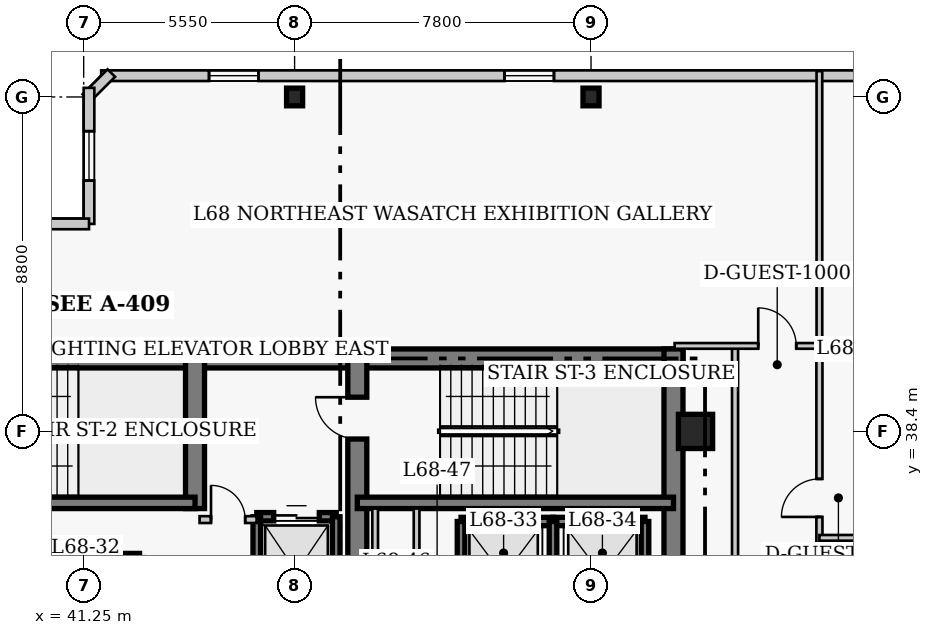
"""IFC4 building model, lengths in metres.
Left out: names, types, materials, properties, quantities, classifications, styles, units other than length and angle.
Written with IfcOpenShell. Run it as: python <this file> out.ifc"""

import sys

from ifc_helpers import new_model, si_unit, direction, frame, frame_2d, origin, origin_2d, place, context, subcontext, project, spatial, rectangle, i_section, extrude, element, fill, save


model = new_model("IFC4")
c1 = context("Model", 3, precision=1e-05, world=origin(), true_north=direction((0.0, 1.0)))
c2 = subcontext(c1, "Body", "Model", "MODEL_VIEW")
j1 = project(units=[si_unit("LENGTHUNIT", "METRE"), si_unit("PLANEANGLEUNIT", "RADIAN")], contexts=[c1])
p1 = place(None, origin())
s1 = spatial("IfcSite", under=j1, at=p1, CompositionType="ELEMENT")
p2 = place(p1, origin())
s2 = spatial("IfcBuilding", under=s1, at=p2, CompositionType="ELEMENT")
p3 = place(p2, frame((0.0, 0.0, 273.4)))
s3 = spatial("IfcBuildingStorey", under=s2, at=p3, CompositionType="ELEMENT", Elevation=273.4)
p4 = place(p3, frame((35.85, 40.32, 0.0), z_axis=(0.0, 0.0, 1.0), x_axis=(1.0, 0.0, 0.0)))
e1 = element("IfcWall", 1, at=p4, inside=s3, PredefinedType="SHEAR", context=c2, shape_type="SweptSolid", body=[
    extrude(rectangle(XDim=12.6, YDim=0.5, at=frame_2d((6.3, 0.0))), origin(), (0.0, 0.0, 1.0), 4.0),
])
p5 = place(p3, frame((48.45, 40.32, 0.0), z_axis=(0.0, 0.0, 1.0), x_axis=(1.0, 0.0, 0.0)))
e2 = element("IfcWall", 2, at=p5, inside=s3, PredefinedType="SHEAR", context=c2, shape_type="SweptSolid", body=[
    extrude(rectangle(XDim=8.57, YDim=0.5, at=frame_2d((4.285, 0.0))), origin(), (0.0, 0.0, 1.0), 4.0),
])
p6 = place(p3, frame((56.77, 27.05, 0.0), z_axis=(0.0, 0.0, 1.0), x_axis=(0.0, 1.0, 0.0)))
e3 = element("IfcWall", 3, at=p6, inside=s3, PredefinedType="SHEAR", context=c2, shape_type="SweptSolid", body=[
    extrude(rectangle(XDim=13.52, YDim=0.5, at=frame_2d((6.76, 0.0))), origin(), (0.0, 0.0, 1.0), 4.0),
])
p7 = place(p3, frame((44.18, 36.37, 0.0), z_axis=(0.0, 0.0, 1.0), x_axis=(0.0, 1.0, 0.0)))
e4 = element("IfcWall", 4, at=p7, inside=s3, PredefinedType="SHEAR", context=c2, shape_type="SweptSolid", body=[
    extrude(rectangle(XDim=3.95, YDim=0.5, at=frame_2d((1.975, 0.0))), origin(), (0.0, 0.0, 1.0), 4.0),
])
p8 = place(p3, frame((48.45, 32.5, 0.0), z_axis=(0.0, 0.0, 1.0), x_axis=(0.0, 1.0, 0.0)))
e5 = element("IfcWall", 5, at=p8, inside=s3, PredefinedType="SHEAR", context=c2, shape_type="SweptSolid", body=[
    extrude(rectangle(XDim=7.82, YDim=0.5, at=frame_2d((3.91, 0.0))), origin(), (0.0, 0.0, 1.0), 4.0),
])
p9 = place(p8, frame((5.7, 0.0, 0.0)))
e6 = element("IfcOpeningElement", 6, at=p9, cuts=e5, PredefinedType="OPENING", context=c2, shape_type="SweptSolid", body=[
    extrude(rectangle(XDim=1.1, YDim=2.15, at=frame_2d((0.55, 1.075))), frame((0.0, 0.26, 0.0), z_axis=(0.0, -1.0, 0.0), x_axis=(1.0, 0.0, 0.0)), (0.0, 0.0, 1.0), 0.52),
])
p10 = place(p3, frame((35.85, 36.52, 0.0), z_axis=(0.0, 0.0, 1.0), x_axis=(1.0, 0.0, 0.0)))
e7 = element("IfcWall", 7, at=p10, inside=s3, PredefinedType="SHEAR", context=c2, shape_type="SweptSolid", body=[
    extrude(rectangle(XDim=8.33, YDim=0.3, at=frame_2d((4.165, 0.0))), origin(), (0.0, 0.0, 1.0), 4.0),
])
p11 = place(p3, frame((48.45, 36.52, 0.0), z_axis=(0.0, 0.0, 1.0), x_axis=(1.0, 0.0, 0.0)))
e8 = element("IfcWall", 8, at=p11, inside=s3, PredefinedType="SHEAR", context=c2, shape_type="SweptSolid", body=[
    extrude(rectangle(XDim=8.32, YDim=0.3, at=frame_2d((4.16, 0.0))), origin(), (0.0, 0.0, 1.0), 4.0),
])
for number, where, z_axis, x_axis in (
    (9, (46.8, 47.2, 0.0), (0.0, 0.0, 1.0), (1.0, 0.0, 0.0)),
    (10, (54.6, 47.2, 0.0), (0.0, 0.0, 1.0), (1.0, 0.0, 0.0)),
):
    element("IfcColumn", number, at=place(p3, frame(where, z_axis=z_axis, x_axis=x_axis)), inside=s3, PredefinedType="COLUMN", context=c2, shape_type="SweptSolid", body=[
        extrude(i_section(OverallWidth=0.422, OverallDepth=0.465, WebThickness=0.045, FlangeThickness=0.073, FilletRadius=0.017, at=origin_2d()), origin(), (0.0, 0.0, 1.0), 4.0),
    ])
p12 = place(p3, frame((57.35, 38.4, 0.0), z_axis=(0.0, 0.0, 1.0), x_axis=(1.0, 0.0, 0.0)))
e11 = element("IfcColumn", 11, at=p12, inside=s3, PredefinedType="COLUMN", context=c2, shape_type="SweptSolid", body=[
    extrude(rectangle(XDim=0.9, YDim=0.9, at=origin_2d()), origin(), (0.0, 0.0, 1.0), 4.0),
])
p13 = place(p3, frame((66.54, 47.76, 0.0), z_axis=(0.0, 0.0, 1.0), x_axis=(-1.0, 0.0, 0.0)))
e12 = element("IfcWall", 12, at=p13, inside=s3, PredefinedType="SOLIDWALL", context=c2, shape_type="SweptSolid", body=[
    extrude(rectangle(XDim=24.83, YDim=0.28, at=frame_2d((12.415, 0.0))), origin(), (0.0, 0.0, 1.0), 3.76),
])
p14 = place(p13, frame((3.488, 0.0, 0.85)))
e13 = element("IfcOpeningElement", 13, at=p14, cuts=e12, PredefinedType="OPENING", context=c2, shape_type="SweptSolid", body=[
    extrude(rectangle(XDim=1.3, YDim=1.7, at=frame_2d((0.65, 0.85))), frame((0.0, 0.15, 0.0), z_axis=(0.0, -1.0, 0.0), x_axis=(1.0, 0.0, 0.0)), (0.0, 0.0, 1.0), 0.3),
])
p15 = place(p13, frame((12.915, 0.0, 0.85)))
e14 = element("IfcOpeningElement", 14, at=p15, cuts=e12, PredefinedType="OPENING", context=c2, shape_type="SweptSolid", body=[
    extrude(rectangle(XDim=1.3, YDim=1.7, at=frame_2d((0.65, 0.85))), frame((0.0, 0.15, 0.0), z_axis=(0.0, -1.0, 0.0), x_axis=(1.0, 0.0, 0.0)), (0.0, 0.0, 1.0), 0.3),
])
p16 = place(p13, frame((20.692, 0.0, 0.85)))
e15 = element("IfcOpeningElement", 15, at=p16, cuts=e12, PredefinedType="OPENING", context=c2, shape_type="SweptSolid", body=[
    extrude(rectangle(XDim=1.3, YDim=1.7, at=frame_2d((0.65, 0.85))), frame((0.0, 0.15, 0.0), z_axis=(0.0, -1.0, 0.0), x_axis=(1.0, 0.0, 0.0)), (0.0, 0.0, 1.0), 0.3),
])
p17 = place(p3, frame((41.977, 47.829, 0.0), z_axis=(0.0, 0.0, 1.0), x_axis=(-0.706975312048, -0.707238225886, 0.0)))
e16 = element("IfcWall", 16, at=p17, inside=s3, PredefinedType="SOLIDWALL", context=c2, shape_type="SweptSolid", body=[
    extrude(rectangle(XDim=0.929, YDim=0.28, at=frame_2d((0.464, 0.0))), origin(), (0.0, 0.0, 1.0), 3.76),
])
p18 = place(p3, frame((41.39, 47.44, 0.0), z_axis=(0.0, 0.0, 1.0), x_axis=(0.0, -1.0, 0.0)))
e17 = element("IfcWall", 17, at=p18, inside=s3, PredefinedType="SOLIDWALL", context=c2, shape_type="SweptSolid", body=[
    extrude(rectangle(XDim=3.58, YDim=0.28, at=frame_2d((1.79, 0.0))), origin(), (0.0, 0.0, 1.0), 3.76),
])
p19 = place(p18, frame((1.14, 0.0, 0.85)))
e18 = element("IfcOpeningElement", 18, at=p19, cuts=e17, PredefinedType="OPENING", context=c2, shape_type="SweptSolid", body=[
    extrude(rectangle(XDim=1.3, YDim=1.7, at=frame_2d((0.65, 0.85))), frame((0.0, 0.15, 0.0), z_axis=(0.0, -1.0, 0.0), x_axis=(1.0, 0.0, 0.0)), (0.0, 0.0, 1.0), 0.3),
])
p20 = place(p3, frame((41.39, 43.86, 0.0), z_axis=(0.0, 0.0, 1.0), x_axis=(-1.0, 0.0, 0.0)))
e19 = element("IfcWall", 19, at=p20, inside=s3, PredefinedType="SOLIDWALL", context=c2, shape_type="SweptSolid", body=[
    extrude(rectangle(XDim=4.78, YDim=0.28, at=frame_2d((2.39, 0.0))), origin(), (0.0, 0.0, 1.0), 3.76),
])
p21 = place(p20, frame((1.74, 0.0, 0.85)))
e20 = element("IfcOpeningElement", 20, at=p21, cuts=e19, PredefinedType="OPENING", context=c2, shape_type="SweptSolid", body=[
    extrude(rectangle(XDim=1.3, YDim=1.7, at=frame_2d((0.65, 0.85))), frame((0.0, 0.15, 0.0), z_axis=(0.0, -1.0, 0.0), x_axis=(1.0, 0.0, 0.0)), (0.0, 0.0, 1.0), 0.3),
])
p22 = place(p3, frame((40.4, 35.08, 0.0), z_axis=(0.0, 0.0, 1.0), x_axis=(1.0, 0.0, 0.0)))
e21 = element("IfcWall", 21, at=p22, inside=s3, PredefinedType="SHEAR", context=c2, shape_type="SweptSolid", body=[
    extrude(rectangle(XDim=2.32, YDim=0.22, at=frame_2d((1.16, 0.0))), origin(), (0.0, 0.0, 1.0), 4.0),
])
p23 = place(p3, frame((51.18, 36.03, 0.0), z_axis=(0.0, 0.0, 1.0), x_axis=(1.0, 0.0, 0.0)))
e22 = element("IfcWall", 22, at=p23, inside=s3, PredefinedType="SHEAR", context=c2, shape_type="SweptSolid", body=[
    extrude(rectangle(XDim=2.42, YDim=0.22, at=frame_2d((1.21, 0.0))), origin(), (0.0, 0.0, 1.0), 4.0),
])
p24 = place(p3, frame((51.18, 33.17, 0.0), z_axis=(0.0, 0.0, 1.0), x_axis=(0.0, 1.0, 0.0)))
e23 = element("IfcWall", 23, at=p24, inside=s3, PredefinedType="SHEAR", context=c2, shape_type="SweptSolid", body=[
    extrude(rectangle(XDim=2.86, YDim=0.2, at=frame_2d((1.43, 0.0))), origin(), (0.0, 0.0, 1.0), 4.0),
])
p25 = place(p3, frame((53.6, 36.03, 0.0), z_axis=(0.0, 0.0, 1.0), x_axis=(1.0, 0.0, 0.0)))
e24 = element("IfcWall", 24, at=p25, inside=s3, PredefinedType="SHEAR", context=c2, shape_type="SweptSolid", body=[
    extrude(rectangle(XDim=2.42, YDim=0.22, at=frame_2d((1.21, 0.0))), origin(), (0.0, 0.0, 1.0), 4.0),
])
for number, where, z_axis, x_axis in (
    (25, (53.6, 33.17, 0.0), (0.0, 0.0, 1.0), (0.0, 1.0, 0.0)),
    (26, (56.02, 33.17, 0.0), (0.0, 0.0, 1.0), (0.0, 1.0, 0.0)),
):
    element("IfcWall", number, at=place(p3, frame(where, z_axis=z_axis, x_axis=x_axis)), inside=s3, PredefinedType="SHEAR", context=c2, shape_type="SweptSolid", body=[
        extrude(rectangle(XDim=2.86, YDim=0.2, at=frame_2d((1.43, 0.0))), origin(), (0.0, 0.0, 1.0), 4.0),
    ])
p26 = place(p3, frame((45.805, 36.155, 0.0), z_axis=(0.0, 0.0, 1.0), x_axis=(1.0, 0.0, 0.0)))
e27 = element("IfcWall", 27, at=p26, inside=s3, PredefinedType="SHEAR", context=c2, shape_type="SweptSolid", body=[
    extrude(rectangle(XDim=2.09, YDim=0.22, at=frame_2d((1.045, 0.0))), origin(), (0.0, 0.0, 1.0), 4.0),
])
p27 = place(p26, frame((0.445, 0.0, 0.0)))
e28 = element("IfcOpeningElement", 28, at=p27, cuts=e27, PredefinedType="OPENING", context=c2, shape_type="SweptSolid", body=[
    extrude(rectangle(XDim=1.2, YDim=2.15, at=frame_2d((0.6, 1.075))), frame((0.0, 0.12, 0.0), z_axis=(0.0, -1.0, 0.0), x_axis=(1.0, 0.0, 0.0)), (0.0, 0.0, 1.0), 0.24),
])
p28 = place(p3, frame((45.805, 32.65, 0.0), z_axis=(0.0, 0.0, 1.0), x_axis=(0.0, 1.0, 0.0)))
e29 = element("IfcWall", 29, at=p28, inside=s3, PredefinedType="SHEAR", context=c2, shape_type="SweptSolid", body=[
    extrude(rectangle(XDim=3.505, YDim=0.2, at=frame_2d((1.752, 0.0))), origin(), (0.0, 0.0, 1.0), 4.0),
])
p29 = place(p3, frame((47.895, 33.245, 0.0), z_axis=(0.0, 0.0, 1.0), x_axis=(0.0, 1.0, 0.0)))
e30 = element("IfcWall", 30, at=p29, inside=s3, PredefinedType="SHEAR", context=c2, shape_type="SweptSolid", body=[
    extrude(rectangle(XDim=2.91, YDim=0.2, at=frame_2d((1.455, 0.0))), origin(), (0.0, 0.0, 1.0), 4.0),
])
p30 = place(p3, frame((44.3, 36.08, 0.0), z_axis=(0.0, 0.0, 1.0), x_axis=(1.0, 0.0, 0.0)))
e31 = element("IfcWall", 31, at=p30, inside=s3, PredefinedType="PARTITIONING", context=c2, shape_type="SweptSolid", body=[
    extrude(rectangle(XDim=1.5, YDim=0.18, at=frame_2d((0.75, 0.0))), origin(), (0.0, 0.0, 1.0), 3.76),
])
p31 = place(p30, frame((0.3, 0.0, 0.0)))
e32 = element("IfcOpeningElement", 32, at=p31, cuts=e31, PredefinedType="OPENING", context=c2, shape_type="SweptSolid", body=[
    extrude(rectangle(XDim=0.9, YDim=2.15, at=frame_2d((0.45, 1.075))), frame((0.0, 0.1, 0.0), z_axis=(0.0, -1.0, 0.0), x_axis=(1.0, 0.0, 0.0)), (0.0, 0.0, 1.0), 0.2),
])
for number, where, z_axis, x_axis in (
    (33, (48.92, 32.75, 0.0), (0.0, 0.0, 1.0), (0.0, 1.0, 0.0)),
    (34, (50.01, 32.75, 0.0), (0.0, 0.0, 1.0), (0.0, 1.0, 0.0)),
):
    element("IfcWall", number, at=place(p3, frame(where, z_axis=z_axis, x_axis=x_axis)), inside=s3, PredefinedType="PARTITIONING", context=c2, shape_type="SweptSolid", body=[
        extrude(rectangle(XDim=3.62, YDim=0.15, at=frame_2d((1.81, 0.0))), origin(), (0.0, 0.0, 1.0), 3.76),
    ])
p32 = place(p3, frame((60.61, 24.25, 0.0), z_axis=(0.0, 0.0, 1.0), x_axis=(0.0, 1.0, 0.0)))
e35 = element("IfcWall", 35, at=p32, inside=s3, PredefinedType="PARTITIONING", context=c2, shape_type="SweptSolid", body=[
    extrude(rectangle(XDim=16.4, YDim=0.16, at=frame_2d((8.2, 0.0))), origin(), (0.0, 0.0, 1.0), 3.76),
])
p33 = place(p32, frame((0.46, 0.0, 0.0)))
e36 = element("IfcOpeningElement", 36, at=p33, cuts=e35, PredefinedType="OPENING", context=c2, shape_type="SweptSolid", body=[
    extrude(rectangle(XDim=0.95, YDim=2.1, at=frame_2d((0.475, 1.05))), frame((0.0, 0.09, 0.0), z_axis=(0.0, -1.0, 0.0), x_axis=(1.0, 0.0, 0.0)), (0.0, 0.0, 1.0), 0.18),
])
p34 = place(p32, frame((11.9, 0.0, 0.0)))
e37 = element("IfcOpeningElement", 37, at=p34, cuts=e35, PredefinedType="OPENING", context=c2, shape_type="SweptSolid", body=[
    extrude(rectangle(XDim=1.0, YDim=2.15, at=frame_2d((0.5, 1.075))), frame((0.0, 0.09, 0.0), z_axis=(0.0, -1.0, 0.0), x_axis=(1.0, 0.0, 0.0)), (0.0, 0.0, 1.0), 0.18),
])
p35 = place(p3, frame((58.39, 26.41, 0.0), z_axis=(0.0, 0.0, 1.0), x_axis=(0.0, 1.0, 0.0)))
e38 = element("IfcWall", 38, at=p35, inside=s3, PredefinedType="PARTITIONING", context=c2, shape_type="SweptSolid", body=[
    extrude(rectangle(XDim=14.24, YDim=0.16, at=frame_2d((7.12, 0.0))), origin(), (0.0, 0.0, 1.0), 3.76),
])
p36 = place(p3, frame((56.8, 40.65, 0.0), z_axis=(0.0, 0.0, 1.0), x_axis=(1.0, 0.0, 0.0)))
e39 = element("IfcWall", 39, at=p36, inside=s3, PredefinedType="PARTITIONING", context=c2, shape_type="SweptSolid", body=[
    extrude(rectangle(XDim=3.81, YDim=0.15, at=frame_2d((1.905, 0.0))), origin(), (0.0, 0.0, 1.0), 3.76),
])
p37 = place(p36, frame((2.2, 0.0, 0.0)))
e40 = element("IfcOpeningElement", 40, at=p37, cuts=e39, PredefinedType="OPENING", context=c2, shape_type="SweptSolid", body=[
    extrude(rectangle(XDim=1.0, YDim=2.15, at=frame_2d((0.5, 1.075))), frame((0.0, 0.085, 0.0), z_axis=(0.0, -1.0, 0.0), x_axis=(1.0, 0.0, 0.0)), (0.0, 0.0, 1.0), 0.17),
])
p38 = place(p3, frame((60.61, 40.65, 0.0), z_axis=(0.0, 0.0, 1.0), x_axis=(0.0, 1.0, 0.0)))
e41 = element("IfcWall", 41, at=p38, inside=s3, PredefinedType="PARTITIONING", context=c2, shape_type="SweptSolid", body=[
    extrude(rectangle(XDim=7.23, YDim=0.15, at=frame_2d((3.615, 0.0))), origin(), (0.0, 0.0, 1.0), 3.76),
])
p39 = place(p3, frame((60.61, 35.6, 0.0), z_axis=(0.0, 0.0, 1.0), x_axis=(1.0, 0.0, 0.0)))
e42 = element("IfcWall", 42, at=p39, inside=s3, PredefinedType="PARTITIONING", context=c2, shape_type="SweptSolid", body=[
    extrude(rectangle(XDim=4.49, YDim=0.15, at=frame_2d((2.245, 0.0))), origin(), (0.0, 0.0, 1.0), 3.76),
])
p40 = place(p15, origin())
e43 = element("IfcWindow", 43, at=p40, inside=s3, PartitioningType="SINGLE_PANEL", PredefinedType="WINDOW", context=c2, shape_type="SweptSolid", body=[
    extrude(rectangle(XDim=1.3, YDim=1.7, at=frame_2d((0.65, 0.85))), frame((0.0, 0.03, 0.0), z_axis=(0.0, -1.0, 0.0), x_axis=(1.0, 0.0, 0.0)), (0.0, 0.0, 1.0), 0.06),
])
fill(e14, e43)
p41 = place(p16, origin())
e44 = element("IfcWindow", 44, at=p41, inside=s3, PartitioningType="SINGLE_PANEL", PredefinedType="WINDOW", context=c2, shape_type="SweptSolid", body=[
    extrude(rectangle(XDim=1.3, YDim=1.7, at=frame_2d((0.65, 0.85))), frame((0.0, 0.03, 0.0), z_axis=(0.0, -1.0, 0.0), x_axis=(1.0, 0.0, 0.0)), (0.0, 0.0, 1.0), 0.06),
])
fill(e15, e44)
p42 = place(p19, origin())
e45 = element("IfcWindow", 45, at=p42, inside=s3, PartitioningType="SINGLE_PANEL", PredefinedType="WINDOW", context=c2, shape_type="SweptSolid", body=[
    extrude(rectangle(XDim=1.3, YDim=1.7, at=frame_2d((0.65, 0.85))), frame((0.0, 0.03, 0.0), z_axis=(0.0, -1.0, 0.0), x_axis=(1.0, 0.0, 0.0)), (0.0, 0.0, 1.0), 0.06),
])
fill(e18, e45)
p43 = place(p27, origin())
e46 = element("IfcDoor", 46, at=p43, inside=s3, OperationType="DOUBLE_DOOR_SLIDING", PredefinedType="DOOR", context=c2, shape_type="SweptSolid", body=[
    extrude(rectangle(XDim=1.2, YDim=2.15, at=frame_2d((0.6, 1.075))), frame((0.0, 0.025, 0.0), z_axis=(0.0, -1.0, 0.0), x_axis=(1.0, 0.0, 0.0)), (0.0, 0.0, 1.0), 0.05),
])
fill(e28, e46)
p44 = place(p31, origin())
e47 = element("IfcDoor", 47, at=p44, inside=s3, OperationType="SINGLE_SWING_LEFT", PredefinedType="DOOR", context=c2, shape_type="SweptSolid", body=[
    extrude(rectangle(XDim=0.9, YDim=2.15, at=frame_2d((0.45, 1.075))), frame((0.0, 0.025, 0.0), z_axis=(0.0, -1.0, 0.0), x_axis=(1.0, 0.0, 0.0)), (0.0, 0.0, 1.0), 0.05),
])
fill(e32, e47)
p45 = place(p37, origin())
e48 = element("IfcDoor", 48, at=p45, inside=s3, OperationType="SINGLE_SWING_LEFT", PredefinedType="DOOR", context=c2, shape_type="SweptSolid", body=[
    extrude(rectangle(XDim=1.0, YDim=2.15, at=frame_2d((0.5, 1.075))), frame((0.0, 0.025, 0.0), z_axis=(0.0, -1.0, 0.0), x_axis=(1.0, 0.0, 0.0)), (0.0, 0.0, 1.0), 0.05),
])
fill(e40, e48)
p46 = place(p34, origin())
e49 = element("IfcDoor", 49, at=p46, inside=s3, OperationType="SINGLE_SWING_LEFT", PredefinedType="DOOR", context=c2, shape_type="SweptSolid", body=[
    extrude(rectangle(XDim=1.0, YDim=2.15, at=frame_2d((0.5, 1.075))), frame((0.0, 0.025, 0.0), z_axis=(0.0, -1.0, 0.0), x_axis=(1.0, 0.0, 0.0)), (0.0, 0.0, 1.0), 0.05),
])
fill(e37, e49)
p47 = place(p9, origin())
e50 = element("IfcDoor", 50, at=p47, inside=s3, OperationType="SINGLE_SWING_RIGHT", PredefinedType="DOOR", context=c2, shape_type="SweptSolid", body=[
    extrude(rectangle(XDim=1.1, YDim=2.15, at=frame_2d((0.55, 1.075))), frame((0.0, 0.025, 0.0), z_axis=(0.0, -1.0, 0.0), x_axis=(1.0, 0.0, 0.0)), (0.0, 0.0, 1.0), 0.05),
])
fill(e6, e50)
save(model, sys.argv[1])
